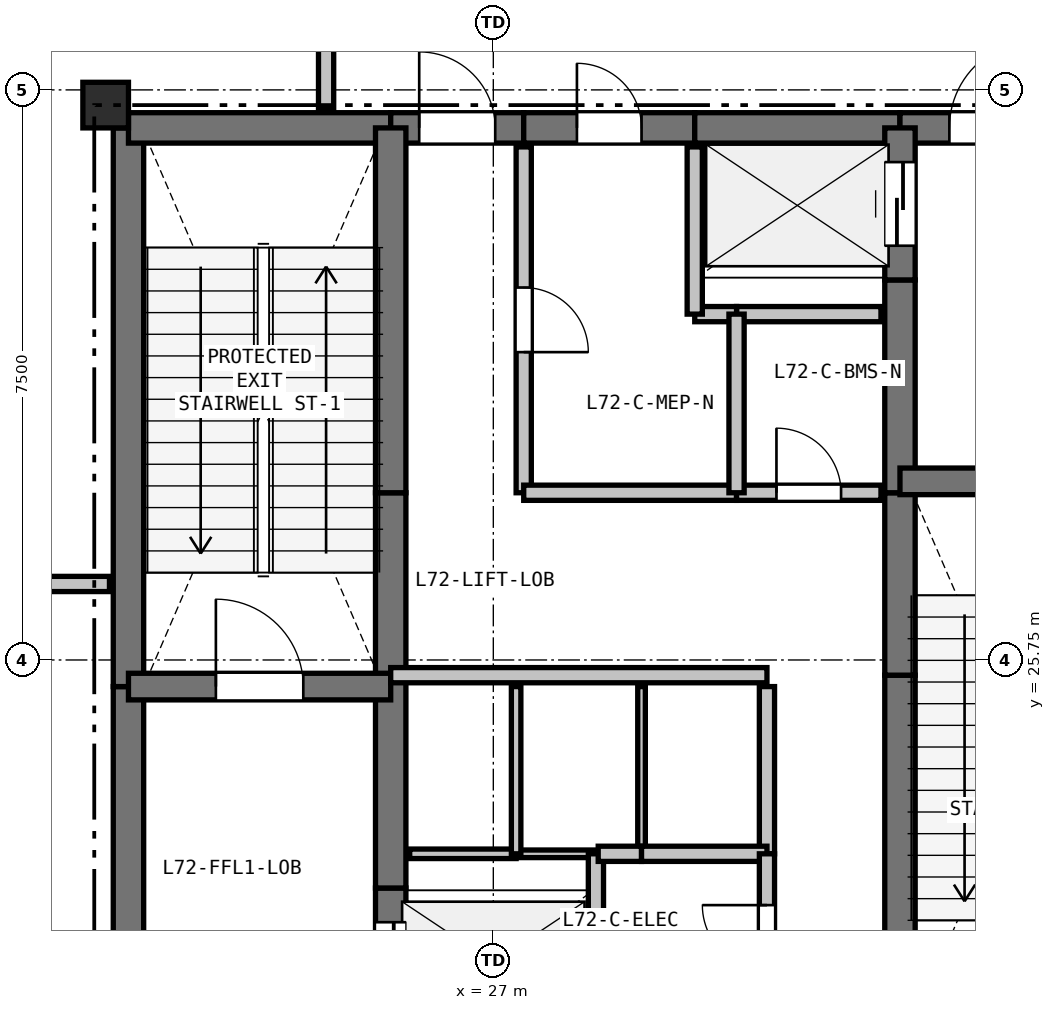
"""IFC4 building model, lengths in metres.
Left out: names, types, materials, properties, quantities, classifications, styles, units other than length and angle.
Written with IfcOpenShell. Run it as: python <this file> out.ifc"""

import sys

from ifc_helpers import new_model, si_unit, direction, frame, frame_2d, origin, origin_2d, place, context, subcontext, project, spatial, rectangle, extrude, element, fill, save


model = new_model("IFC4")
c1 = context("Model", 3, precision=1e-05, world=origin(), true_north=direction((0.0, 1.0)))
c2 = subcontext(c1, "Body", "Model", "MODEL_VIEW")
j1 = project(units=[si_unit("LENGTHUNIT", "METRE"), si_unit("PLANEANGLEUNIT", "RADIAN")], contexts=[c1])
p1 = place(None, origin())
s1 = spatial("IfcSite", under=j1, at=p1, CompositionType="ELEMENT")
p2 = place(p1, origin())
s2 = spatial("IfcBuilding", under=s1, at=p2, CompositionType="ELEMENT")
p3 = place(p2, frame((0.0, 0.0, 258.6)))
s3 = spatial("IfcBuildingStorey", under=s2, at=p3, CompositionType="ELEMENT", Elevation=258.6)
p4 = place(p3, frame((21.9, 33.05, 0.0), z_axis=(0.0, 0.0, 1.0), x_axis=(1.0, 0.0, 0.0)))
e1 = element("IfcColumn", 1, at=p4, inside=s3, PredefinedType="COLUMN", context=c2, shape_type="SweptSolid", body=[
    extrude(rectangle(XDim=0.6, YDim=0.6, at=origin_2d()), origin(), (0.0, 0.0, 1.0), 5.4),
])
p5 = place(p3, frame((22.2, 20.75, 0.0), z_axis=(0.0, 0.0, 1.0), x_axis=(0.0, 1.0, 0.0)))
e2 = element("IfcWall", 2, at=p5, inside=s3, PredefinedType="SHEAR", context=c2, shape_type="SweptSolid", body=[
    extrude(rectangle(XDim=4.65, YDim=0.4, at=frame_2d((2.325, 0.0))), origin(), (0.0, 0.0, 1.0), 5.08),
])
p6 = place(p3, frame((22.2, 25.4, 0.0), z_axis=(0.0, 0.0, 1.0), x_axis=(0.0, 1.0, 0.0)))
e3 = element("IfcWall", 3, at=p6, inside=s3, PredefinedType="SHEAR", context=c2, shape_type="SweptSolid", body=[
    extrude(rectangle(XDim=7.35, YDim=0.4, at=frame_2d((3.675, 0.0))), origin(), (0.0, 0.0, 1.0), 5.08),
])
p7 = place(p3, frame((22.2, 32.75, 0.0), z_axis=(0.0, 0.0, 1.0), x_axis=(1.0, 0.0, 0.0)))
e4 = element("IfcWall", 4, at=p7, inside=s3, PredefinedType="SHEAR", context=c2, shape_type="SweptSolid", body=[
    extrude(rectangle(XDim=3.45, YDim=0.4, at=frame_2d((1.725, 0.0))), origin(), (0.0, 0.0, 1.0), 5.08),
])
p8 = place(p3, frame((25.65, 32.75, 0.0), z_axis=(0.0, 0.0, 1.0), x_axis=(1.0, 0.0, 0.0)))
e5 = element("IfcWall", 5, at=p8, inside=s3, PredefinedType="SHEAR", context=c2, shape_type="SweptSolid", body=[
    extrude(rectangle(XDim=1.75, YDim=0.4, at=frame_2d((0.875, 0.0))), origin(), (0.0, 0.0, 1.0), 5.08),
])
p9 = place(p8, frame((0.375, 0.0, 0.0)))
e6 = element("IfcOpeningElement", 6, at=p9, cuts=e5, PredefinedType="OPENING", context=c2, shape_type="SweptSolid", body=[
    extrude(rectangle(XDim=1.0, YDim=2.15, at=frame_2d((0.5, 1.075))), frame((0.0, 0.21, 0.0), z_axis=(0.0, -1.0, 0.0), x_axis=(1.0, 0.0, 0.0)), (0.0, 0.0, 1.0), 0.42),
])
p10 = place(p3, frame((27.4, 32.75, 0.0), z_axis=(0.0, 0.0, 1.0), x_axis=(1.0, 0.0, 0.0)))
e7 = element("IfcWall", 7, at=p10, inside=s3, PredefinedType="SHEAR", context=c2, shape_type="SweptSolid", body=[
    extrude(rectangle(XDim=2.25, YDim=0.4, at=frame_2d((1.125, 0.0))), origin(), (0.0, 0.0, 1.0), 5.08),
])
p11 = place(p10, frame((0.7, 0.0, 0.0)))
e8 = element("IfcOpeningElement", 8, at=p11, cuts=e7, PredefinedType="OPENING", context=c2, shape_type="SweptSolid", body=[
    extrude(rectangle(XDim=0.85, YDim=2.1, at=frame_2d((0.425, 1.05))), frame((0.0, 0.21, 0.0), z_axis=(0.0, -1.0, 0.0), x_axis=(1.0, 0.0, 0.0)), (0.0, 0.0, 1.0), 0.42),
])
p12 = place(p3, frame((29.65, 32.75, 0.0), z_axis=(0.0, 0.0, 1.0), x_axis=(1.0, 0.0, 0.0)))
e9 = element("IfcWall", 9, at=p12, inside=s3, PredefinedType="SHEAR", context=c2, shape_type="SweptSolid", body=[
    extrude(rectangle(XDim=2.7, YDim=0.4, at=frame_2d((1.35, 0.0))), origin(), (0.0, 0.0, 1.0), 5.08),
])
p13 = place(p3, frame((32.35, 32.75, 0.0), z_axis=(0.0, 0.0, 1.0), x_axis=(1.0, 0.0, 0.0)))
e10 = element("IfcWall", 10, at=p13, inside=s3, PredefinedType="SHEAR", context=c2, shape_type="SweptSolid", body=[
    extrude(rectangle(XDim=3.45, YDim=0.4, at=frame_2d((1.725, 0.0))), origin(), (0.0, 0.0, 1.0), 5.08),
])
p14 = place(p13, frame((0.65, 0.0, 0.0)))
e11 = element("IfcOpeningElement", 11, at=p14, cuts=e10, PredefinedType="OPENING", context=c2, shape_type="SweptSolid", body=[
    extrude(rectangle(XDim=1.15, YDim=2.15, at=frame_2d((0.575, 1.075))), frame((0.0, 0.21, 0.0), z_axis=(0.0, -1.0, 0.0), x_axis=(1.0, 0.0, 0.0)), (0.0, 0.0, 1.0), 0.42),
])
p15 = place(p3, frame((25.65, 20.75, 0.0), z_axis=(0.0, 0.0, 1.0), x_axis=(0.0, 1.0, 0.0)))
e12 = element("IfcWall", 12, at=p15, inside=s3, PredefinedType="SHEAR", context=c2, shape_type="SweptSolid", body=[
    extrude(rectangle(XDim=2.0, YDim=0.4, at=frame_2d((1.0, 0.0))), origin(), (0.0, 0.0, 1.0), 5.08),
])
p16 = place(p15, frame((0.45, 0.0, 0.0)))
e13 = element("IfcOpeningElement", 13, at=p16, cuts=e12, PredefinedType="OPENING", context=c2, shape_type="SweptSolid", body=[
    extrude(rectangle(XDim=1.1, YDim=2.15, at=frame_2d((0.55, 1.075))), frame((0.0, 0.21, 0.0), z_axis=(0.0, -1.0, 0.0), x_axis=(1.0, 0.0, 0.0)), (0.0, 0.0, 1.0), 0.42),
])
p17 = place(p3, frame((25.65, 22.75, 0.0), z_axis=(0.0, 0.0, 1.0), x_axis=(0.0, 1.0, 0.0)))
e14 = element("IfcWall", 14, at=p17, inside=s3, PredefinedType="SHEAR", context=c2, shape_type="SweptSolid", body=[
    extrude(rectangle(XDim=2.8, YDim=0.4, at=frame_2d((1.4, 0.0))), origin(), (0.0, 0.0, 1.0), 5.08),
])
p18 = place(p3, frame((25.65, 25.55, 0.0), z_axis=(0.0, 0.0, 1.0), x_axis=(0.0, 1.0, 0.0)))
e15 = element("IfcWall", 15, at=p18, inside=s3, PredefinedType="SHEAR", context=c2, shape_type="SweptSolid", body=[
    extrude(rectangle(XDim=2.4, YDim=0.4, at=frame_2d((1.2, 0.0))), origin(), (0.0, 0.0, 1.0), 5.08),
])
for number, where, z_axis, x_axis in (
    (16, (25.65, 27.95, 0.0), (0.0, 0.0, 1.0), (0.0, 1.0, 0.0)),
    (17, (32.35, 20.75, 0.0), (0.0, 0.0, 1.0), (0.0, 1.0, 0.0)),
):
    element("IfcWall", number, at=place(p3, frame(where, z_axis=z_axis, x_axis=x_axis)), inside=s3, PredefinedType="SHEAR", context=c2, shape_type="SweptSolid", body=[
        extrude(rectangle(XDim=4.8, YDim=0.4, at=frame_2d((2.4, 0.0))), origin(), (0.0, 0.0, 1.0), 5.08),
    ])
p19 = place(p3, frame((32.35, 25.55, 0.0), z_axis=(0.0, 0.0, 1.0), x_axis=(0.0, 1.0, 0.0)))
e18 = element("IfcWall", 18, at=p19, inside=s3, PredefinedType="SHEAR", context=c2, shape_type="SweptSolid", body=[
    extrude(rectangle(XDim=2.4, YDim=0.4, at=frame_2d((1.2, 0.0))), origin(), (0.0, 0.0, 1.0), 5.08),
])
p20 = place(p3, frame((32.35, 27.95, 0.0), z_axis=(0.0, 0.0, 1.0), x_axis=(0.0, 1.0, 0.0)))
e19 = element("IfcWall", 19, at=p20, inside=s3, PredefinedType="SHEAR", context=c2, shape_type="SweptSolid", body=[
    extrude(rectangle(XDim=2.8, YDim=0.4, at=frame_2d((1.4, 0.0))), origin(), (0.0, 0.0, 1.0), 5.08),
])
p21 = place(p3, frame((32.35, 30.75, 0.0), z_axis=(0.0, 0.0, 1.0), x_axis=(0.0, 1.0, 0.0)))
e20 = element("IfcWall", 20, at=p21, inside=s3, PredefinedType="SHEAR", context=c2, shape_type="SweptSolid", body=[
    extrude(rectangle(XDim=2.0, YDim=0.4, at=frame_2d((1.0, 0.0))), origin(), (0.0, 0.0, 1.0), 5.08),
])
p22 = place(p21, frame((0.45, 0.0, 0.0)))
e21 = element("IfcOpeningElement", 21, at=p22, cuts=e20, PredefinedType="OPENING", context=c2, shape_type="SweptSolid", body=[
    extrude(rectangle(XDim=1.1, YDim=2.15, at=frame_2d((0.55, 1.075))), frame((0.0, 0.21, 0.0), z_axis=(0.0, -1.0, 0.0), x_axis=(1.0, 0.0, 0.0)), (0.0, 0.0, 1.0), 0.42),
])
p23 = place(p3, frame((22.2, 25.4, 0.0), z_axis=(0.0, 0.0, 1.0), x_axis=(1.0, 0.0, 0.0)))
e22 = element("IfcWall", 22, at=p23, inside=s3, PredefinedType="SHEAR", context=c2, shape_type="SweptSolid", body=[
    extrude(rectangle(XDim=3.45, YDim=0.35, at=frame_2d((1.725, 0.0))), origin(), (0.0, 0.0, 1.0), 5.08),
])
p24 = place(p23, frame((1.15, 0.0, 0.0)))
e23 = element("IfcOpeningElement", 23, at=p24, cuts=e22, PredefinedType="OPENING", context=c2, shape_type="SweptSolid", body=[
    extrude(rectangle(XDim=1.15, YDim=2.15, at=frame_2d((0.575, 1.075))), frame((0.0, 0.185, 0.0), z_axis=(0.0, -1.0, 0.0), x_axis=(1.0, 0.0, 0.0)), (0.0, 0.0, 1.0), 0.37),
])
p25 = place(p3, frame((32.35, 28.1, 0.0), z_axis=(0.0, 0.0, 1.0), x_axis=(1.0, 0.0, 0.0)))
e24 = element("IfcWall", 24, at=p25, inside=s3, PredefinedType="SHEAR", context=c2, shape_type="SweptSolid", body=[
    extrude(rectangle(XDim=3.45, YDim=0.35, at=frame_2d((1.725, 0.0))), origin(), (0.0, 0.0, 1.0), 5.08),
])
p26 = place(p25, frame((1.15, 0.0, 0.0)))
e25 = element("IfcOpeningElement", 25, at=p26, cuts=e24, PredefinedType="OPENING", context=c2, shape_type="SweptSolid", body=[
    extrude(rectangle(XDim=1.15, YDim=2.15, at=frame_2d((0.575, 1.075))), frame((0.0, 0.185, 0.0), z_axis=(0.0, -1.0, 0.0), x_axis=(1.0, 0.0, 0.0)), (0.0, 0.0, 1.0), 0.37),
])
p27 = place(p3, frame((25.65, 25.55, 0.0), z_axis=(0.0, 0.0, 1.0), x_axis=(1.0, 0.0, 0.0)))
e26 = element("IfcWall", 26, at=p27, inside=s3, PredefinedType="PARTITIONING", context=c2, shape_type="SweptSolid", body=[
    extrude(rectangle(XDim=4.95, YDim=0.2, at=frame_2d((2.475, 0.0))), origin(), (0.0, 0.0, 1.0), 5.08),
])
p28 = place(p3, frame((25.9, 23.2, 0.0), z_axis=(0.0, 0.0, 1.0), x_axis=(1.0, 0.0, 0.0)))
e27 = element("IfcWall", 27, at=p28, inside=s3, PredefinedType="PARTITIONING", context=c2, shape_type="SweptSolid", body=[
    extrude(rectangle(XDim=1.4, YDim=0.125, at=frame_2d((0.7, 0.0))), origin(), (0.0, 0.0, 1.0), 5.08),
])
p29 = place(p3, frame((27.3, 23.2, 0.0), z_axis=(0.0, 0.0, 1.0), x_axis=(1.0, 0.0, 0.0)))
e28 = element("IfcWall", 28, at=p29, inside=s3, PredefinedType="PARTITIONING", context=c2, shape_type="SweptSolid", body=[
    extrude(rectangle(XDim=1.05, YDim=0.1, at=frame_2d((0.525, 0.0))), origin(), (0.0, 0.0, 1.0), 5.08),
])
p30 = place(p3, frame((28.35, 23.2, 0.0), z_axis=(0.0, 0.0, 1.0), x_axis=(0.0, -1.0, 0.0)))
e29 = element("IfcWall", 29, at=p30, inside=s3, PredefinedType="PARTITIONING", context=c2, shape_type="SweptSolid", body=[
    extrude(rectangle(XDim=2.2, YDim=0.2, at=frame_2d((1.1, 0.0))), origin(), (0.0, 0.0, 1.0), 5.08),
])
p31 = place(p3, frame((32.1, 30.3, 0.0), z_axis=(0.0, 0.0, 1.0), x_axis=(-1.0, 0.0, 0.0)))
e30 = element("IfcWall", 30, at=p31, inside=s3, PredefinedType="PARTITIONING", context=c2, shape_type="SweptSolid", body=[
    extrude(rectangle(XDim=1.9, YDim=0.2, at=frame_2d((0.95, 0.0))), origin(), (0.0, 0.0, 1.0), 5.08),
])
p32 = place(p3, frame((30.2, 30.3, 0.0), z_axis=(0.0, 0.0, 1.0), x_axis=(-1.0, 0.0, 0.0)))
e31 = element("IfcWall", 31, at=p32, inside=s3, PredefinedType="PARTITIONING", context=c2, shape_type="SweptSolid", body=[
    extrude(rectangle(XDim=0.55, YDim=0.2, at=frame_2d((0.275, 0.0))), origin(), (0.0, 0.0, 1.0), 5.08),
])
p33 = place(p3, frame((29.65, 30.3, 0.0), z_axis=(0.0, 0.0, 1.0), x_axis=(0.0, 1.0, 0.0)))
e32 = element("IfcWall", 32, at=p33, inside=s3, PredefinedType="PARTITIONING", context=c2, shape_type="SweptSolid", body=[
    extrude(rectangle(XDim=2.2, YDim=0.2, at=frame_2d((1.1, 0.0))), origin(), (0.0, 0.0, 1.0), 5.08),
])
p34 = place(p3, frame((27.3, 25.4, 0.0), z_axis=(0.0, 0.0, 1.0), x_axis=(0.0, -1.0, 0.0)))
e33 = element("IfcWall", 33, at=p34, inside=s3, PredefinedType="PARTITIONING", context=c2, shape_type="SweptSolid", body=[
    extrude(rectangle(XDim=2.2, YDim=0.125, at=frame_2d((1.1, 0.0))), origin(), (0.0, 0.0, 1.0), 5.08),
])
p35 = place(p3, frame((28.95, 25.4, 0.0), z_axis=(0.0, 0.0, 1.0), x_axis=(0.0, -1.0, 0.0)))
e34 = element("IfcWall", 34, at=p35, inside=s3, PredefinedType="PARTITIONING", context=c2, shape_type="SweptSolid", body=[
    extrude(rectangle(XDim=2.2, YDim=0.1, at=frame_2d((1.1, 0.0))), origin(), (0.0, 0.0, 1.0), 5.08),
])
p36 = place(p3, frame((28.95, 23.2, 0.0), z_axis=(0.0, 0.0, 1.0), x_axis=(-1.0, 0.0, 0.0)))
e35 = element("IfcWall", 35, at=p36, inside=s3, PredefinedType="PARTITIONING", context=c2, shape_type="SweptSolid", body=[
    extrude(rectangle(XDim=0.57, YDim=0.2, at=frame_2d((0.285, 0.0))), origin(), (0.0, 0.0, 1.0), 5.08),
])
p37 = place(p3, frame((30.6, 25.4, 0.0), z_axis=(0.0, 0.0, 1.0), x_axis=(0.0, -1.0, 0.0)))
e36 = element("IfcWall", 36, at=p37, inside=s3, PredefinedType="PARTITIONING", context=c2, shape_type="SweptSolid", body=[
    extrude(rectangle(XDim=2.2, YDim=0.2, at=frame_2d((1.1, 0.0))), origin(), (0.0, 0.0, 1.0), 5.08),
])
p38 = place(p3, frame((30.6, 23.2, 0.0), z_axis=(0.0, 0.0, 1.0), x_axis=(-1.0, 0.0, 0.0)))
e37 = element("IfcWall", 37, at=p38, inside=s3, PredefinedType="PARTITIONING", context=c2, shape_type="SweptSolid", body=[
    extrude(rectangle(XDim=1.65, YDim=0.2, at=frame_2d((0.825, 0.0))), origin(), (0.0, 0.0, 1.0), 5.08),
])
p39 = place(p3, frame((30.6, 21.0, 0.0), z_axis=(0.0, 0.0, 1.0), x_axis=(0.0, 1.0, 0.0)))
e38 = element("IfcWall", 38, at=p39, inside=s3, PredefinedType="PARTITIONING", context=c2, shape_type="SweptSolid", body=[
    extrude(rectangle(XDim=2.2, YDim=0.2, at=frame_2d((1.1, 0.0))), origin(), (0.0, 0.0, 1.0), 5.08),
])
p40 = place(p39, frame((0.675, 0.0, 0.0)))
e39 = element("IfcOpeningElement", 39, at=p40, cuts=e38, PredefinedType="OPENING", context=c2, shape_type="SweptSolid", body=[
    extrude(rectangle(XDim=0.85, YDim=2.1, at=frame_2d((0.425, 1.05))), frame((0.0, 0.11, 0.0), z_axis=(0.0, -1.0, 0.0), x_axis=(1.0, 0.0, 0.0)), (0.0, 0.0, 1.0), 0.22),
])
p41 = place(p3, frame((27.4, 32.5, 0.0), z_axis=(0.0, 0.0, 1.0), x_axis=(0.0, -1.0, 0.0)))
e40 = element("IfcWall", 40, at=p41, inside=s3, PredefinedType="PARTITIONING", context=c2, shape_type="SweptSolid", body=[
    extrude(rectangle(XDim=4.55, YDim=0.2, at=frame_2d((2.275, 0.0))), origin(), (0.0, 0.0, 1.0), 5.08),
])
p42 = place(p41, frame((1.85, 0.0, 0.0)))
e41 = element("IfcOpeningElement", 41, at=p42, cuts=e40, PredefinedType="OPENING", context=c2, shape_type="SweptSolid", body=[
    extrude(rectangle(XDim=0.85, YDim=2.1, at=frame_2d((0.425, 1.05))), frame((0.0, 0.11, 0.0), z_axis=(0.0, -1.0, 0.0), x_axis=(1.0, 0.0, 0.0)), (0.0, 0.0, 1.0), 0.22),
])
p43 = place(p3, frame((27.4, 27.95, 0.0), z_axis=(0.0, 0.0, 1.0), x_axis=(1.0, 0.0, 0.0)))
e42 = element("IfcWall", 42, at=p43, inside=s3, PredefinedType="PARTITIONING", context=c2, shape_type="SweptSolid", body=[
    extrude(rectangle(XDim=2.8, YDim=0.2, at=frame_2d((1.4, 0.0))), origin(), (0.0, 0.0, 1.0), 5.08),
])
p44 = place(p3, frame((30.2, 27.95, 0.0), z_axis=(0.0, 0.0, 1.0), x_axis=(1.0, 0.0, 0.0)))
e43 = element("IfcWall", 43, at=p44, inside=s3, PredefinedType="PARTITIONING", context=c2, shape_type="SweptSolid", body=[
    extrude(rectangle(XDim=1.9, YDim=0.2, at=frame_2d((0.95, 0.0))), origin(), (0.0, 0.0, 1.0), 5.08),
])
p45 = place(p44, frame((0.525, 0.0, 0.0)))
e44 = element("IfcOpeningElement", 44, at=p45, cuts=e43, PredefinedType="OPENING", context=c2, shape_type="SweptSolid", body=[
    extrude(rectangle(XDim=0.85, YDim=2.1, at=frame_2d((0.425, 1.05))), frame((0.0, 0.11, 0.0), z_axis=(0.0, -1.0, 0.0), x_axis=(1.0, 0.0, 0.0)), (0.0, 0.0, 1.0), 0.22),
])
p46 = place(p3, frame((24.8, 33.0, 0.0), z_axis=(0.0, 0.0, 1.0), x_axis=(0.0, 1.0, 0.0)))
e45 = element("IfcWall", 45, at=p46, inside=s3, PredefinedType="PARTITIONING", context=c2, shape_type="SweptSolid", body=[
    extrude(rectangle(XDim=2.55, YDim=0.2, at=frame_2d((1.275, 0.0))), origin(), (0.0, 0.0, 1.0), 4.605),
])
p47 = place(p3, frame((30.2, 30.3, 0.0), z_axis=(0.0, 0.0, 1.0), x_axis=(0.0, -1.0, 0.0)))
e46 = element("IfcWall", 46, at=p47, inside=s3, PredefinedType="PARTITIONING", context=c2, shape_type="SweptSolid", body=[
    extrude(rectangle(XDim=2.35, YDim=0.2, at=frame_2d((1.175, 0.0))), origin(), (0.0, 0.0, 1.0), 5.08),
])
p48 = place(p3, frame((21.95, 26.75, 0.0), z_axis=(0.0, 0.0, 1.0), x_axis=(-1.0, 0.0, 0.0)))
e47 = element("IfcWall", 47, at=p48, inside=s3, PredefinedType="PARTITIONING", context=c2, shape_type="SweptSolid", body=[
    extrude(rectangle(XDim=11.082, YDim=0.2, at=frame_2d((5.541, 0.0))), origin(), (0.0, 0.0, 1.0), 4.605),
])
p49 = place(p48, frame((5.116, 0.0, 0.0)))
e48 = element("IfcOpeningElement", 48, at=p49, cuts=e47, PredefinedType="OPENING", context=c2, shape_type="SweptSolid", body=[
    extrude(rectangle(XDim=0.85, YDim=2.1, at=frame_2d((0.425, 1.05))), frame((0.0, 0.11, 0.0), z_axis=(0.0, -1.0, 0.0), x_axis=(1.0, 0.0, 0.0)), (0.0, 0.0, 1.0), 0.22),
])
p50 = place(p9, origin())
e49 = element("IfcDoor", 49, at=p50, inside=s3, OperationType="SINGLE_SWING_LEFT", PredefinedType="DOOR", context=c2, shape_type="SweptSolid", body=[
    extrude(rectangle(XDim=1.0, YDim=2.15, at=frame_2d((0.5, 1.075))), frame((0.0, 0.025, 0.0), z_axis=(0.0, -1.0, 0.0), x_axis=(1.0, 0.0, 0.0)), (0.0, 0.0, 1.0), 0.05),
])
fill(e6, e49)
p51 = place(p16, origin())
e50 = element("IfcDoor", 50, at=p51, inside=s3, OperationType="SLIDING_TO_LEFT", PredefinedType="DOOR", context=c2, shape_type="SweptSolid", body=[
    extrude(rectangle(XDim=1.1, YDim=2.15, at=frame_2d((0.55, 1.075))), frame((0.0, 0.025, 0.0), z_axis=(0.0, -1.0, 0.0), x_axis=(1.0, 0.0, 0.0)), (0.0, 0.0, 1.0), 0.05),
])
fill(e13, e50)
p52 = place(p22, origin())
e51 = element("IfcDoor", 51, at=p52, inside=s3, OperationType="SLIDING_TO_LEFT", PredefinedType="DOOR", context=c2, shape_type="SweptSolid", body=[
    extrude(rectangle(XDim=1.1, YDim=2.15, at=frame_2d((0.55, 1.075))), frame((0.0, 0.025, 0.0), z_axis=(0.0, -1.0, 0.0), x_axis=(1.0, 0.0, 0.0)), (0.0, 0.0, 1.0), 0.05),
])
fill(e21, e51)
p53 = place(p24, origin())
e52 = element("IfcDoor", 52, at=p53, inside=s3, OperationType="SINGLE_SWING_LEFT", PredefinedType="DOOR", context=c2, shape_type="SweptSolid", body=[
    extrude(rectangle(XDim=1.15, YDim=2.15, at=frame_2d((0.575, 1.075))), frame((0.0, 0.025, 0.0), z_axis=(0.0, -1.0, 0.0), x_axis=(1.0, 0.0, 0.0)), (0.0, 0.0, 1.0), 0.05),
])
fill(e23, e52)
p54 = place(p14, origin())
e53 = element("IfcDoor", 53, at=p54, inside=s3, OperationType="SINGLE_SWING_RIGHT", PredefinedType="DOOR", context=c2, shape_type="SweptSolid", body=[
    extrude(rectangle(XDim=1.15, YDim=2.15, at=frame_2d((0.575, 1.075))), frame((0.0, 0.025, 0.0), z_axis=(0.0, -1.0, 0.0), x_axis=(1.0, 0.0, 0.0)), (0.0, 0.0, 1.0), 0.05),
])
fill(e11, e53)
p55 = place(p42, origin())
e54 = element("IfcDoor", 54, at=p55, inside=s3, OperationType="SINGLE_SWING_RIGHT", PredefinedType="DOOR", context=c2, shape_type="SweptSolid", body=[
    extrude(rectangle(XDim=0.85, YDim=2.1, at=frame_2d((0.425, 1.05))), frame((0.0, 0.025, 0.0), z_axis=(0.0, -1.0, 0.0), x_axis=(1.0, 0.0, 0.0)), (0.0, 0.0, 1.0), 0.05),
])
fill(e41, e54)
p56 = place(p45, origin())
e55 = element("IfcDoor", 55, at=p56, inside=s3, OperationType="SINGLE_SWING_LEFT", PredefinedType="DOOR", context=c2, shape_type="SweptSolid", body=[
    extrude(rectangle(XDim=0.85, YDim=2.1, at=frame_2d((0.425, 1.05))), frame((0.0, 0.025, 0.0), z_axis=(0.0, -1.0, 0.0), x_axis=(1.0, 0.0, 0.0)), (0.0, 0.0, 1.0), 0.05),
])
fill(e44, e55)
p57 = place(p40, origin())
e56 = element("IfcDoor", 56, at=p57, inside=s3, OperationType="SINGLE_SWING_RIGHT", PredefinedType="DOOR", context=c2, shape_type="SweptSolid", body=[
    extrude(rectangle(XDim=0.85, YDim=2.1, at=frame_2d((0.425, 1.05))), frame((0.0, 0.025, 0.0), z_axis=(0.0, -1.0, 0.0), x_axis=(1.0, 0.0, 0.0)), (0.0, 0.0, 1.0), 0.05),
])
fill(e39, e56)
p58 = place(p11, origin())
e57 = element("IfcDoor", 57, at=p58, inside=s3, OperationType="SINGLE_SWING_LEFT", PredefinedType="DOOR", context=c2, shape_type="SweptSolid", body=[
    extrude(rectangle(XDim=0.85, YDim=2.1, at=frame_2d((0.425, 1.05))), frame((0.0, 0.025, 0.0), z_axis=(0.0, -1.0, 0.0), x_axis=(1.0, 0.0, 0.0)), (0.0, 0.0, 1.0), 0.05),
])
fill(e8, e57)
save(model, sys.argv[1])
